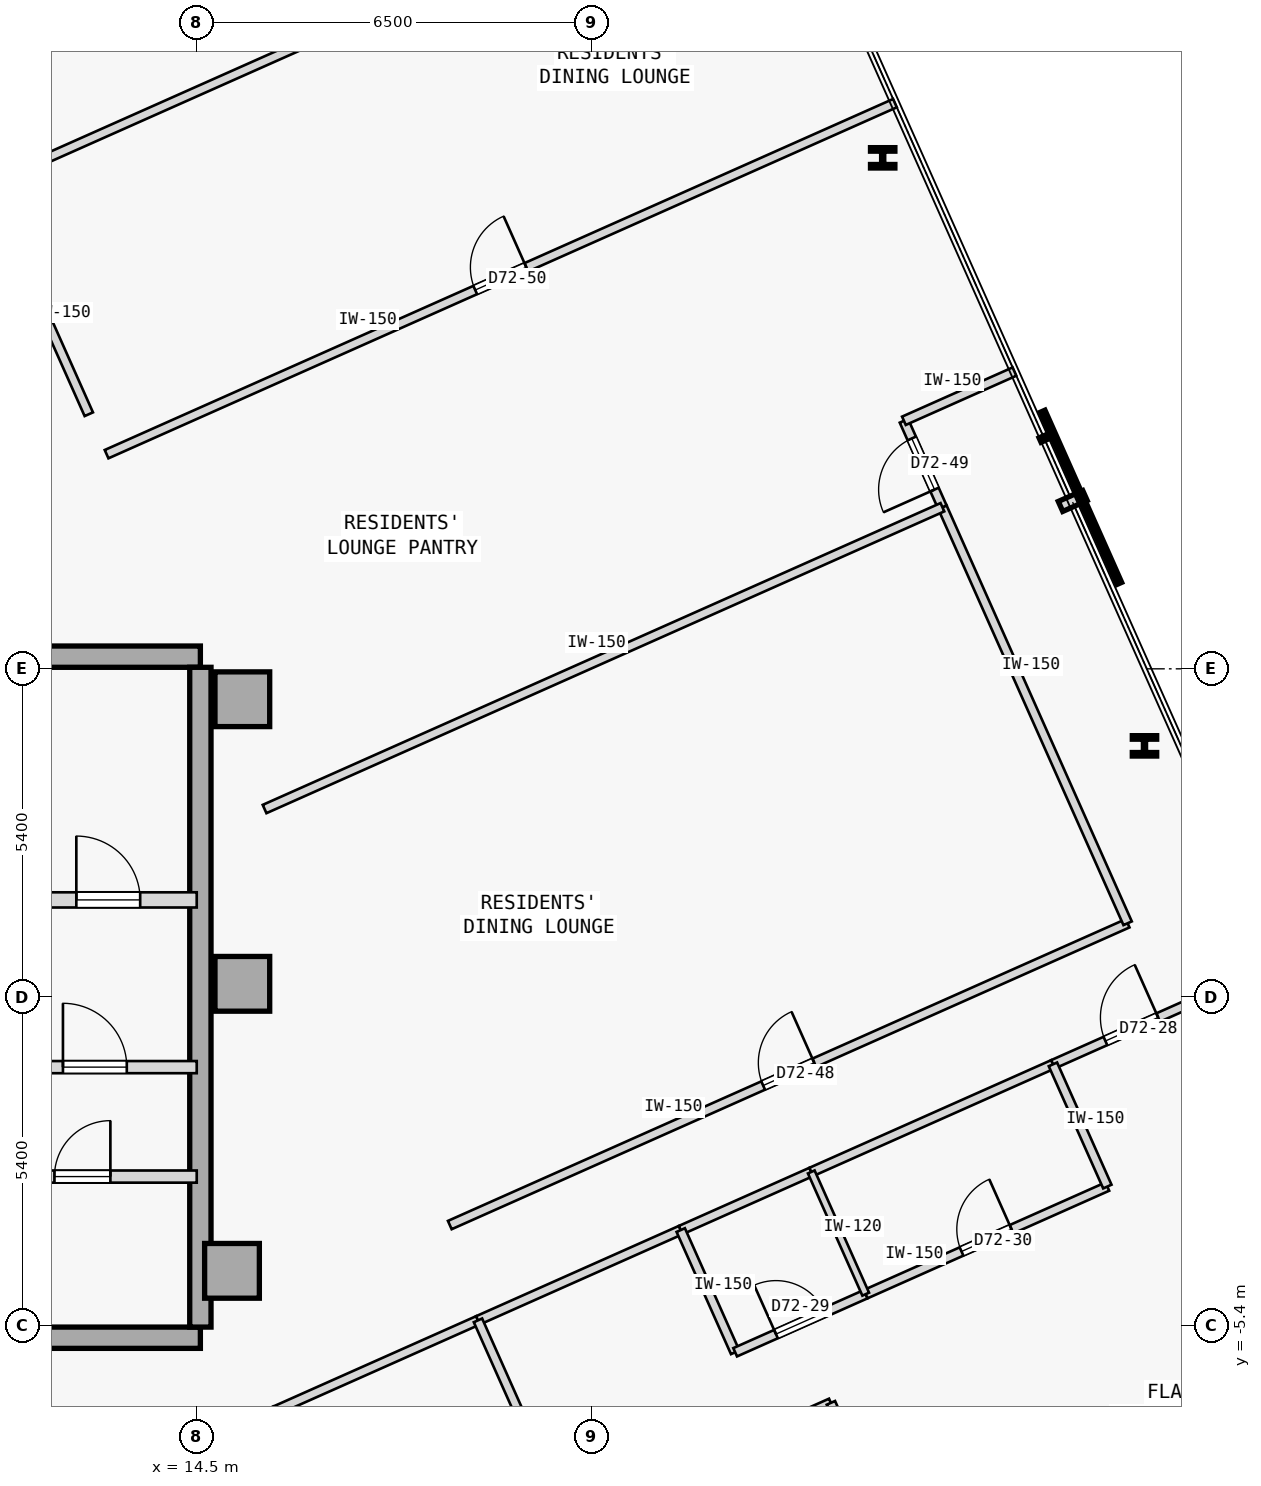
"""IFC4 building model, lengths in metres.
Left out: names, types, materials, properties, quantities, classifications, styles, units other than length and angle.
Written with IfcOpenShell. Run it as: python <this file> out.ifc"""

import sys

from ifc_helpers import new_model, si_unit, direction, frame, frame_2d, origin, origin_2d, place, context, subcontext, project, spatial, rectangle, i_section, extrude, element, fill, save


model = new_model("IFC4")
c1 = context("Model", 3, precision=1e-05, world=origin(), true_north=direction((0.0, 1.0)))
c2 = subcontext(c1, "Body", "Model", "MODEL_VIEW")
j1 = project(units=[si_unit("LENGTHUNIT", "METRE"), si_unit("PLANEANGLEUNIT", "RADIAN")], contexts=[c1])
p1 = place(None, origin())
s1 = spatial("IfcSite", under=j1, at=p1, CompositionType="ELEMENT")
p2 = place(p1, origin())
s2 = spatial("IfcBuilding", under=s1, at=p2, CompositionType="ELEMENT")
p3 = place(p2, frame((0.0, 0.0, 268.9)))
s3 = spatial("IfcBuildingStorey", under=s2, at=p3, CompositionType="ELEMENT", Elevation=268.9)
for number, where, z_axis, x_axis in (
    (1, (15.25, 4.9, 0.0), (0.0, 0.0, 1.0), (1.0, 0.0, 0.0)),
    (2, (15.25, 0.22, 0.0), (0.0, 0.0, 1.0), (1.0, 0.0, 0.0)),
    (3, (15.08, -4.5, 0.0), (0.0, 0.0, 1.0), (1.0, 0.0, 0.0)),
):
    element("IfcColumn", number, at=place(p3, frame(where, z_axis=z_axis, x_axis=x_axis)), inside=s3, PredefinedType="COLUMN", context=c2, shape_type="SweptSolid", body=[
        extrude(rectangle(XDim=0.9, YDim=0.9, at=origin_2d()), origin(), (0.0, 0.0, 1.0), 3.35),
    ])
p4 = place(p3, frame((3.15, 5.6, 0.0), z_axis=(0.0, 0.0, 1.0), x_axis=(1.0, 0.0, 0.0)))
e4 = element("IfcWall", 4, at=p4, inside=s3, PredefinedType="SHEAR", context=c2, shape_type="SweptSolid", body=[
    extrude(rectangle(XDim=11.41, YDim=0.35, at=frame_2d((5.705, 0.0))), origin(), (0.0, 0.0, 1.0), 3.125),
])
p5 = place(p3, frame((3.7, -5.6, 0.0), z_axis=(0.0, 0.0, 1.0), x_axis=(1.0, 0.0, 0.0)))
e5 = element("IfcWall", 5, at=p5, inside=s3, PredefinedType="SHEAR", context=c2, shape_type="SweptSolid", body=[
    extrude(rectangle(XDim=10.86, YDim=0.35, at=frame_2d((5.43, 0.0))), origin(), (0.0, 0.0, 1.0), 3.125),
])
p6 = place(p3, frame((14.56, -5.425, 0.0), z_axis=(0.0, 0.0, 1.0), x_axis=(0.0, 1.0, 0.0)))
e6 = element("IfcWall", 6, at=p6, inside=s3, PredefinedType="SHEAR", context=c2, shape_type="SweptSolid", body=[
    extrude(rectangle(XDim=10.85, YDim=0.35, at=frame_2d((5.425, 0.0))), origin(), (0.0, 0.0, 1.0), 3.125),
])
for number, where, z_axis, x_axis in (
    (7, (30.086, 4.133, 0.0), (0.0, 0.0, 1.0), (1.0, 0.0, 0.0)),
    (8, (25.781, 13.803, 0.0), (0.0, 0.0, 1.0), (1.0, 0.0, 0.0)),
):
    element("IfcColumn", number, at=place(p3, frame(where, z_axis=z_axis, x_axis=x_axis)), inside=s3, PredefinedType="COLUMN", context=c2, shape_type="SweptSolid", body=[
        extrude(i_section(OverallWidth=0.401, OverallDepth=0.335, WebThickness=0.036, FlangeThickness=0.058, FilletRadius=0.015, at=origin_2d()), origin(), (0.0, 0.0, 1.0), 3.35),
    ])
p7 = place(p3, frame((10.9, 1.6, 0.0), z_axis=(0.0, 0.0, 1.0), x_axis=(1.0, 0.0, 0.0)))
e9 = element("IfcWall", 9, at=p7, inside=s3, PredefinedType="STANDARD", context=c2, shape_type="SweptSolid", body=[
    extrude(rectangle(XDim=3.6, YDim=0.25, at=frame_2d((1.8, 0.0))), origin(), (0.0, 0.0, 1.0), 3.125),
])
p8 = place(p7, frame((1.62, 0.0, 0.0)))
e10 = element("IfcOpeningElement", 10, at=p8, cuts=e9, PredefinedType="OPENING", context=c2, shape_type="SweptSolid", body=[
    extrude(rectangle(XDim=1.05, YDim=2.15, at=frame_2d((0.525, 1.075))), frame((0.0, 0.135, 0.0), z_axis=(0.0, -1.0, 0.0), x_axis=(1.0, 0.0, 0.0)), (0.0, 0.0, 1.0), 0.27),
])
p9 = place(p3, frame((11.55, -1.15, 0.0), z_axis=(0.0, 0.0, 1.0), x_axis=(1.0, 0.0, 0.0)))
e11 = element("IfcWall", 11, at=p9, inside=s3, PredefinedType="STANDARD", context=c2, shape_type="SweptSolid", body=[
    extrude(rectangle(XDim=2.95, YDim=0.2, at=frame_2d((1.475, 0.0))), origin(), (0.0, 0.0, 1.0), 3.125),
])
p10 = place(p9, frame((0.75, 0.0, 0.0)))
e12 = element("IfcOpeningElement", 12, at=p10, cuts=e11, PredefinedType="OPENING", context=c2, shape_type="SweptSolid", body=[
    extrude(rectangle(XDim=1.05, YDim=2.18, at=frame_2d((0.525, 1.09))), frame((0.0, 0.11, 0.0), z_axis=(0.0, -1.0, 0.0), x_axis=(1.0, 0.0, 0.0)), (0.0, 0.0, 1.0), 0.22),
])
p11 = place(p3, frame((3.7, -2.95, 0.0), z_axis=(0.0, 0.0, 1.0), x_axis=(1.0, 0.0, 0.0)))
e13 = element("IfcWall", 13, at=p11, inside=s3, PredefinedType="STANDARD", context=c2, shape_type="SweptSolid", body=[
    extrude(rectangle(XDim=10.8, YDim=0.2, at=frame_2d((5.4, 0.0))), origin(), (0.0, 0.0, 1.0), 3.125),
])
p12 = place(p11, frame((0.53, 0.0, 0.0)))
e14 = element("IfcOpeningElement", 14, at=p12, cuts=e13, PredefinedType="OPENING", context=c2, shape_type="SweptSolid", body=[
    extrude(rectangle(XDim=1.1, YDim=2.15, at=frame_2d((0.55, 1.075))), frame((0.0, 0.11, 0.0), z_axis=(0.0, -1.0, 0.0), x_axis=(1.0, 0.0, 0.0)), (0.0, 0.0, 1.0), 0.22),
])
p13 = place(p11, frame((4.14, 0.0, 0.0)))
e15 = element("IfcOpeningElement", 15, at=p13, cuts=e13, PredefinedType="OPENING", context=c2, shape_type="SweptSolid", body=[
    extrude(rectangle(XDim=0.92, YDim=2.15, at=frame_2d((0.46, 1.075))), frame((0.0, 0.11, 0.0), z_axis=(0.0, -1.0, 0.0), x_axis=(1.0, 0.0, 0.0)), (0.0, 0.0, 1.0), 0.22),
])
p14 = place(p11, frame((8.46, 0.0, 0.0)))
e16 = element("IfcOpeningElement", 16, at=p14, cuts=e13, PredefinedType="OPENING", context=c2, shape_type="SweptSolid", body=[
    extrude(rectangle(XDim=0.92, YDim=2.15, at=frame_2d((0.46, 1.075))), frame((0.0, 0.11, 0.0), z_axis=(0.0, -1.0, 0.0), x_axis=(1.0, 0.0, 0.0)), (0.0, 0.0, 1.0), 0.22),
])
for number, where, z_axis, x_axis in (
    (17, (15.791, -6.799, 0.0), (0.0, 0.0, 1.0), (0.914, 0.407, 0.0)),
    (18, (19.125, -5.314, 0.0), (0.0, 0.0, 1.0), (0.914, 0.407, 0.0)),
):
    element("IfcWall", number, at=place(p3, frame(where, z_axis=z_axis, x_axis=x_axis)), inside=s3, PredefinedType="PARTITIONING", context=c2, shape_type="SweptSolid", body=[
        extrude(rectangle(XDim=3.65, YDim=0.15, at=frame_2d((1.825, 0.0))), origin(), (0.0, 0.0, 1.0), 3.125),
    ])
p15 = place(p3, frame((28.581, -1.104, 0.0), z_axis=(0.0, 0.0, 1.0), x_axis=(0.91352836412, 0.406775033585, 0.0)))
e19 = element("IfcWall", 19, at=p15, inside=s3, PredefinedType="PARTITIONING", context=c2, shape_type="SweptSolid", body=[
    extrude(rectangle(XDim=4.056, YDim=0.15, at=frame_2d((2.028, 0.0))), origin(), (0.0, 0.0, 1.0), 3.125),
])
p16 = place(p15, frame((0.945, 0.0, 0.0)))
e20 = element("IfcOpeningElement", 20, at=p16, cuts=e19, PredefinedType="OPENING", context=c2, shape_type="SweptSolid", body=[
    extrude(rectangle(XDim=0.95, YDim=2.15, at=frame_2d((0.475, 1.075))), frame((0.0, 0.085, 0.0), z_axis=(0.0, -1.0, 0.0), x_axis=(1.0, 0.0, 0.0)), (0.0, 0.0, 1.0), 0.17),
])
p17 = place(p3, frame((22.46, -3.83, 0.0), z_axis=(0.0, 0.0, 1.0), x_axis=(0.913541436194, 0.406745675276, 0.0)))
e21 = element("IfcWall", 21, at=p17, inside=s3, PredefinedType="PARTITIONING", context=c2, shape_type="SweptSolid", body=[
    extrude(rectangle(XDim=2.35, YDim=0.15, at=frame_2d((1.175, 0.0))), origin(), (0.0, 0.0, 1.0), 3.125),
])
p18 = place(p3, frame((24.606, -2.874, 0.0), z_axis=(0.0, 0.0, 1.0), x_axis=(0.913554477336, 0.406716383908, 0.0)))
e22 = element("IfcWall", 22, at=p18, inside=s3, PredefinedType="PARTITIONING", context=c2, shape_type="SweptSolid", body=[
    extrude(rectangle(XDim=4.35, YDim=0.15, at=frame_2d((2.175, 0.0))), origin(), (0.0, 0.0, 1.0), 3.125),
])
p19 = place(p3, frame((18.662, -3.747, 0.0), z_axis=(0.0, 0.0, 1.0), x_axis=(0.91353989142, 0.406749144787, 0.0)))
e23 = element("IfcWall", 23, at=p19, inside=s3, PredefinedType="PARTITIONING", context=c2, shape_type="SweptSolid", body=[
    extrude(rectangle(XDim=12.202, YDim=0.15, at=frame_2d((6.101, 0.0))), origin(), (0.0, 0.0, 1.0), 3.125),
])
p20 = place(p19, frame((5.641, 0.0, 0.0)))
e24 = element("IfcOpeningElement", 24, at=p20, cuts=e23, PredefinedType="OPENING", context=c2, shape_type="SweptSolid", body=[
    extrude(rectangle(XDim=0.92, YDim=2.15, at=frame_2d((0.46, 1.075))), frame((0.0, 0.085, 0.0), z_axis=(0.0, -1.0, 0.0), x_axis=(1.0, 0.0, 0.0)), (0.0, 0.0, 1.0), 0.17),
])
p21 = place(p3, frame((29.809, 1.216, 0.0), z_axis=(0.0, 0.0, 1.0), x_axis=(-0.406719136744, 0.913553251763, 0.0)))
e25 = element("IfcWall", 25, at=p21, inside=s3, PredefinedType="PARTITIONING", context=c2, shape_type="SweptSolid", body=[
    extrude(rectangle(XDim=7.489, YDim=0.15, at=frame_2d((3.745, 0.0))), origin(), (0.0, 0.0, 1.0), 3.125),
])
p22 = place(p3, frame((26.763, 8.057, 0.0), z_axis=(0.0, 0.0, 1.0), x_axis=(-0.406851688687, 0.913494227356, 0.0)))
e26 = element("IfcWall", 26, at=p22, inside=s3, PredefinedType="PARTITIONING", context=c2, shape_type="SweptSolid", body=[
    extrude(rectangle(XDim=1.556, YDim=0.15, at=frame_2d((0.778, 0.0))), origin(), (0.0, 0.0, 1.0), 3.125),
])
p23 = place(p22, frame((0.318, 0.0, 0.0)))
e27 = element("IfcOpeningElement", 27, at=p23, cuts=e26, PredefinedType="OPENING", context=c2, shape_type="SweptSolid", body=[
    extrude(rectangle(XDim=0.92, YDim=2.15, at=frame_2d((0.46, 1.075))), frame((0.0, 0.085, 0.0), z_axis=(0.0, -1.0, 0.0), x_axis=(1.0, 0.0, 0.0)), (0.0, 0.0, 1.0), 0.17),
])
p24 = place(p3, frame((26.13, 9.479, 0.0), z_axis=(0.0, 0.0, 1.0), x_axis=(0.913573626813, 0.406673368186, 0.0)))
e28 = element("IfcWall", 28, at=p24, inside=s3, PredefinedType="PARTITIONING", context=c2, shape_type="SweptSolid", body=[
    extrude(rectangle(XDim=1.99, YDim=0.15, at=frame_2d((0.995, 0.0))), origin(), (0.0, 0.0, 1.0), 3.125),
])
p25 = place(p3, frame((23.003, -14.025, 0.0), z_axis=(0.0, 0.0, 1.0), x_axis=(-0.406729927653, 0.913548447512, 0.0)))
e29 = element("IfcWall", 29, at=p25, inside=s3, PredefinedType="PARTITIONING", context=c2, shape_type="SweptSolid", body=[
    extrude(rectangle(XDim=9.535, YDim=0.15, at=frame_2d((4.768, 0.0))), origin(), (0.0, 0.0, 1.0), 3.125),
])
p26 = place(p3, frame((23.354, -5.839, 0.0), z_axis=(0.0, 0.0, 1.0), x_axis=(-0.406725294076, 0.913550510459, 0.0)))
e30 = element("IfcWall", 30, at=p26, inside=s3, PredefinedType="PARTITIONING", context=c2, shape_type="SweptSolid", body=[
    extrude(rectangle(XDim=2.2, YDim=0.15, at=frame_2d((1.1, 0.0))), origin(), (0.0, 0.0, 1.0), 3.125),
])
p27 = place(p3, frame((23.354, -5.839, 0.0), z_axis=(0.0, 0.0, 1.0), x_axis=(0.913558622212, 0.406707073682, 0.0)))
e31 = element("IfcWall", 31, at=p27, inside=s3, PredefinedType="PARTITIONING", context=c2, shape_type="SweptSolid", body=[
    extrude(rectangle(XDim=2.35, YDim=0.15, at=frame_2d((1.175, 0.0))), origin(), (0.0, 0.0, 1.0), 3.125),
])
p28 = place(p27, frame((0.735, 0.0, 0.0)))
e32 = element("IfcOpeningElement", 32, at=p28, cuts=e31, PredefinedType="OPENING", context=c2, shape_type="SweptSolid", body=[
    extrude(rectangle(XDim=0.88, YDim=2.15, at=frame_2d((0.44, 1.075))), frame((0.0, 0.085, 0.0), z_axis=(0.0, -1.0, 0.0), x_axis=(1.0, 0.0, 0.0)), (0.0, 0.0, 1.0), 0.17),
])
p29 = place(p3, frame((25.501, -4.884, 0.0), z_axis=(0.0, 0.0, 1.0), x_axis=(0.913545193015, 0.406737237438, 0.0)))
e33 = element("IfcWall", 33, at=p29, inside=s3, PredefinedType="PARTITIONING", context=c2, shape_type="SweptSolid", body=[
    extrude(rectangle(XDim=4.35, YDim=0.15, at=frame_2d((2.175, 0.0))), origin(), (0.0, 0.0, 1.0), 3.125),
])
p30 = place(p29, frame((1.725, 0.0, 0.0)))
e34 = element("IfcOpeningElement", 34, at=p30, cuts=e33, PredefinedType="OPENING", context=c2, shape_type="SweptSolid", body=[
    extrude(rectangle(XDim=0.9, YDim=2.15, at=frame_2d((0.45, 1.075))), frame((0.0, 0.085, 0.0), z_axis=(0.0, -1.0, 0.0), x_axis=(1.0, 0.0, 0.0)), (0.0, 0.0, 1.0), 0.17),
])
p31 = place(p3, frame((29.475, -3.114, 0.0), z_axis=(0.0, 0.0, 1.0), x_axis=(-0.406725294076, 0.913550510459, 0.0)))
e35 = element("IfcWall", 35, at=p31, inside=s3, PredefinedType="PARTITIONING", context=c2, shape_type="SweptSolid", body=[
    extrude(rectangle(XDim=2.2, YDim=0.15, at=frame_2d((1.1, 0.0))), origin(), (0.0, 0.0, 1.0), 3.125),
])
p32 = place(p3, frame((20.681, -8.562, 0.0), z_axis=(0.0, 0.0, 1.0), x_axis=(0.91354505039, 0.40673755778, 0.0)))
e36 = element("IfcWall", 36, at=p32, inside=s3, PredefinedType="PARTITIONING", context=c2, shape_type="SweptSolid", body=[
    extrude(rectangle(XDim=4.65, YDim=0.15, at=frame_2d((2.325, 0.0))), origin(), (0.0, 0.0, 1.0), 3.125),
])
p33 = place(p3, frame((27.343, -12.093, 0.0), z_axis=(0.0, 0.0, 1.0), x_axis=(-0.406714717734, 0.913555219119, 0.0)))
e37 = element("IfcWall", 37, at=p33, inside=s3, PredefinedType="PARTITIONING", context=c2, shape_type="SweptSolid", body=[
    extrude(rectangle(XDim=5.935, YDim=0.15, at=frame_2d((2.967, 0.0))), origin(), (0.0, 0.0, 1.0), 3.125),
])
p34 = place(p33, frame((2.518, 0.0, 0.0)))
e38 = element("IfcOpeningElement", 38, at=p34, cuts=e37, PredefinedType="OPENING", context=c2, shape_type="SweptSolid", body=[
    extrude(rectangle(XDim=0.9, YDim=2.15, at=frame_2d((0.45, 1.075))), frame((0.0, 0.085, 0.0), z_axis=(0.0, -1.0, 0.0), x_axis=(1.0, 0.0, 0.0)), (0.0, 0.0, 1.0), 0.17),
])
p35 = place(p3, frame((25.501, -4.884, 0.0), z_axis=(0.0, 0.0, 1.0), x_axis=(-0.406817905151, 0.913509273105, 0.0)))
e39 = element("IfcWall", 39, at=p35, inside=s3, PredefinedType="PARTITIONING", context=c2, shape_type="SweptSolid", body=[
    extrude(rectangle(XDim=2.2, YDim=0.12, at=frame_2d((1.1, 0.0))), origin(), (0.0, 0.0, 1.0), 3.125),
])
p36 = place(p3, frame((12.725, 9.587, 0.0), z_axis=(0.0, 0.0, 1.0), x_axis=(-0.406714462948, 0.913555332549, 0.0)))
e40 = element("IfcWall", 40, at=p36, inside=s3, PredefinedType="PARTITIONING", context=c2, shape_type="SweptSolid", body=[
    extrude(rectangle(XDim=3.421, YDim=0.15, at=frame_2d((1.71, 0.0))), origin(), (0.0, 0.0, 1.0), 3.125),
])
p37 = place(p3, frame((15.616, 3.094, 0.0), z_axis=(0.0, 0.0, 1.0), x_axis=(0.913550635989, 0.40672501212, 0.0)))
e41 = element("IfcWall", 41, at=p37, inside=s3, PredefinedType="PARTITIONING", context=c2, shape_type="SweptSolid", body=[
    extrude(rectangle(XDim=12.202, YDim=0.15, at=frame_2d((6.101, 0.0))), origin(), (0.0, 0.0, 1.0), 3.125),
])
p38 = place(p3, frame((13.018, 8.93, 0.0), z_axis=(0.0, 0.0, 1.0), x_axis=(0.913551014388, 0.406724162191, 0.0)))
e42 = element("IfcWall", 42, at=p38, inside=s3, PredefinedType="PARTITIONING", context=c2, shape_type="SweptSolid", body=[
    extrude(rectangle(XDim=14.192, YDim=0.15, at=frame_2d((7.096, 0.0))), origin(), (0.0, 0.0, 1.0), 3.125),
])
p39 = place(p38, frame((6.636, 0.0, 0.0)))
e43 = element("IfcOpeningElement", 43, at=p39, cuts=e42, PredefinedType="OPENING", context=c2, shape_type="SweptSolid", body=[
    extrude(rectangle(XDim=0.92, YDim=2.15, at=frame_2d((0.46, 1.075))), frame((0.0, 0.085, 0.0), z_axis=(0.0, -1.0, 0.0), x_axis=(1.0, 0.0, 0.0)), (0.0, 0.0, 1.0), 0.17),
])
p40 = place(p3, frame((11.046, 13.357, 0.0), z_axis=(0.0, 0.0, 1.0), x_axis=(0.913553860075, 0.406717770379, 0.0)))
e44 = element("IfcWall", 44, at=p40, inside=s3, PredefinedType="PARTITIONING", context=c2, shape_type="SweptSolid", body=[
    extrude(rectangle(XDim=14.192, YDim=0.15, at=frame_2d((7.096, 0.0))), origin(), (0.0, 0.0, 1.0), 3.125),
])
p41 = place(p8, origin())
e45 = element("IfcDoor", 45, at=p41, inside=s3, OperationType="SINGLE_SWING_LEFT", PredefinedType="DOOR", context=c2, shape_type="SweptSolid", body=[
    extrude(rectangle(XDim=1.05, YDim=2.15, at=frame_2d((0.525, 1.075))), frame((0.0, 0.025, 0.0), z_axis=(0.0, -1.0, 0.0), x_axis=(1.0, 0.0, 0.0)), (0.0, 0.0, 1.0), 0.05),
])
fill(e10, e45)
p42 = place(p10, origin())
e46 = element("IfcDoor", 46, at=p42, inside=s3, OperationType="SINGLE_SWING_LEFT", PredefinedType="DOOR", context=c2, shape_type="SweptSolid", body=[
    extrude(rectangle(XDim=1.05, YDim=2.18, at=frame_2d((0.525, 1.09))), frame((0.0, 0.025, 0.0), z_axis=(0.0, -1.0, 0.0), x_axis=(1.0, 0.0, 0.0)), (0.0, 0.0, 1.0), 0.05),
])
fill(e12, e46)
p43 = place(p14, origin())
e47 = element("IfcDoor", 47, at=p43, inside=s3, OperationType="SINGLE_SWING_RIGHT", PredefinedType="DOOR", context=c2, shape_type="SweptSolid", body=[
    extrude(rectangle(XDim=0.92, YDim=2.15, at=frame_2d((0.46, 1.075))), frame((0.0, 0.025, 0.0), z_axis=(0.0, -1.0, 0.0), x_axis=(1.0, 0.0, 0.0)), (0.0, 0.0, 1.0), 0.05),
])
fill(e16, e47)
p44 = place(p16, origin())
e48 = element("IfcDoor", 48, at=p44, inside=s3, OperationType="SINGLE_SWING_RIGHT", PredefinedType="DOOR", context=c2, shape_type="SweptSolid", body=[
    extrude(rectangle(XDim=0.95, YDim=2.15, at=frame_2d((0.475, 1.075))), frame((0.0, 0.025, 0.0), z_axis=(0.0, -1.0, 0.0), x_axis=(1.0, 0.0, 0.0)), (0.0, 0.0, 1.0), 0.05),
])
fill(e20, e48)
p45 = place(p28, origin())
e49 = element("IfcDoor", 49, at=p45, inside=s3, OperationType="SINGLE_SWING_LEFT", PredefinedType="DOOR", context=c2, shape_type="SweptSolid", body=[
    extrude(rectangle(XDim=0.88, YDim=2.15, at=frame_2d((0.44, 1.075))), frame((0.0, 0.025, 0.0), z_axis=(0.0, -1.0, 0.0), x_axis=(1.0, 0.0, 0.0)), (0.0, 0.0, 1.0), 0.05),
])
fill(e32, e49)
p46 = place(p30, origin())
e50 = element("IfcDoor", 50, at=p46, inside=s3, OperationType="SINGLE_SWING_RIGHT", PredefinedType="DOOR", context=c2, shape_type="SweptSolid", body=[
    extrude(rectangle(XDim=0.9, YDim=2.15, at=frame_2d((0.45, 1.075))), frame((0.0, 0.025, 0.0), z_axis=(0.0, -1.0, 0.0), x_axis=(1.0, 0.0, 0.0)), (0.0, 0.0, 1.0), 0.05),
])
fill(e34, e50)
p47 = place(p20, origin())
e51 = element("IfcDoor", 51, at=p47, inside=s3, OperationType="SINGLE_SWING_RIGHT", PredefinedType="DOOR", context=c2, shape_type="SweptSolid", body=[
    extrude(rectangle(XDim=0.92, YDim=2.15, at=frame_2d((0.46, 1.075))), frame((0.0, 0.025, 0.0), z_axis=(0.0, -1.0, 0.0), x_axis=(1.0, 0.0, 0.0)), (0.0, 0.0, 1.0), 0.05),
])
fill(e24, e51)
p48 = place(p23, origin())
e52 = element("IfcDoor", 52, at=p48, inside=s3, OperationType="SINGLE_SWING_LEFT", PredefinedType="DOOR", context=c2, shape_type="SweptSolid", body=[
    extrude(rectangle(XDim=0.92, YDim=2.15, at=frame_2d((0.46, 1.075))), frame((0.0, 0.025, 0.0), z_axis=(0.0, -1.0, 0.0), x_axis=(1.0, 0.0, 0.0)), (0.0, 0.0, 1.0), 0.05),
])
fill(e27, e52)
p49 = place(p39, origin())
e53 = element("IfcDoor", 53, at=p49, inside=s3, OperationType="SINGLE_SWING_RIGHT", PredefinedType="DOOR", context=c2, shape_type="SweptSolid", body=[
    extrude(rectangle(XDim=0.92, YDim=2.15, at=frame_2d((0.46, 1.075))), frame((0.0, 0.025, 0.0), z_axis=(0.0, -1.0, 0.0), x_axis=(1.0, 0.0, 0.0)), (0.0, 0.0, 1.0), 0.05),
])
fill(e43, e53)
save(model, sys.argv[1])
